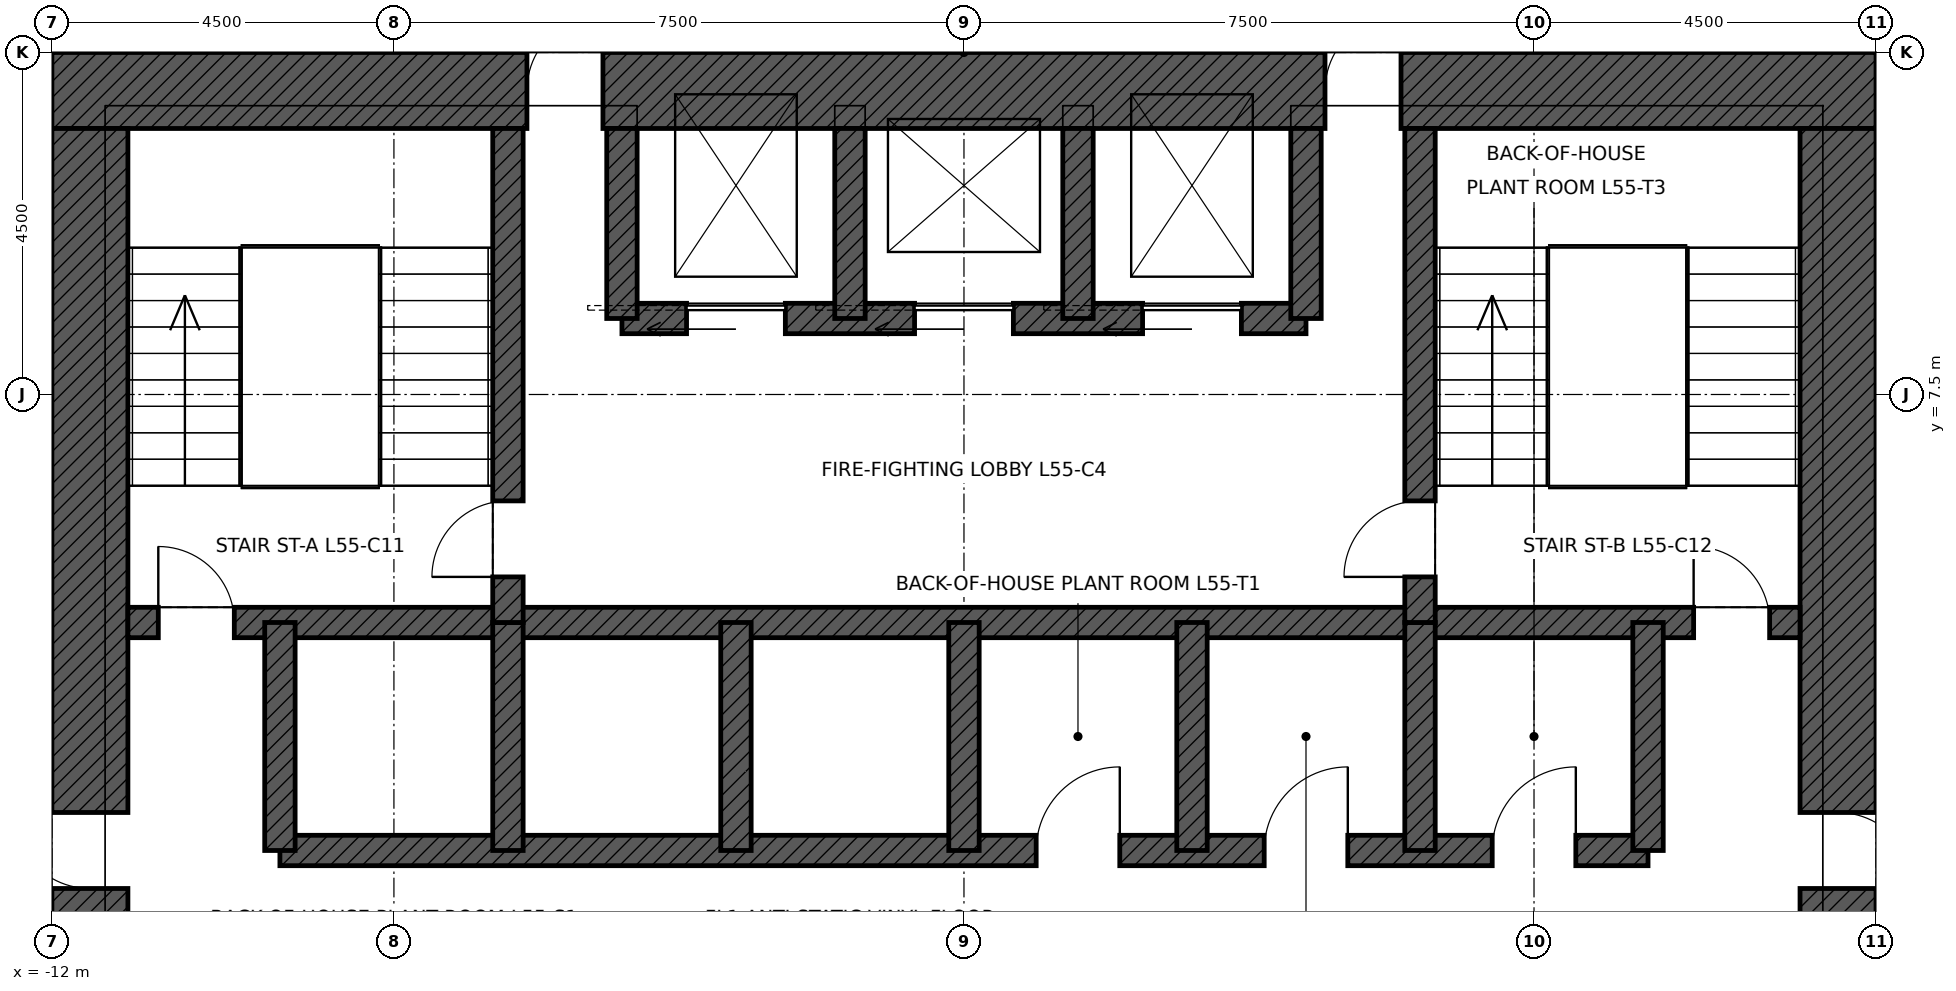
"""IFC4 building model, lengths in metres.
Left out: names, types, materials, properties, quantities, classifications, styles, units other than length and angle.
Written with IfcOpenShell. Run it as: python <this file> out.ifc"""

import sys

from ifc_helpers import new_model, si_unit, direction, frame, frame_2d, origin, place, context, subcontext, project, spatial, rectangle, extrude, element, fill, save


model = new_model("IFC4")
c1 = context("Model", 3, precision=1e-05, world=origin(), true_north=direction((0.0, 1.0)))
c2 = subcontext(c1, "Body", "Model", "MODEL_VIEW")
j1 = project(units=[si_unit("LENGTHUNIT", "METRE"), si_unit("PLANEANGLEUNIT", "RADIAN")], contexts=[c1])
p1 = place(None, origin())
s1 = spatial("IfcSite", under=j1, at=p1, CompositionType="ELEMENT")
p2 = place(p1, origin())
s2 = spatial("IfcBuilding", under=s1, at=p2, CompositionType="ELEMENT")
p3 = place(p2, frame((0.0, 0.0, 253.9)))
s3 = spatial("IfcBuildingStorey", under=s2, at=p3, CompositionType="ELEMENT", Elevation=253.9)
p4 = place(p3, frame((-12.0, 11.5, 0.0), z_axis=(0.0, 0.0, 1.0), x_axis=(1.0, 0.0, 0.0)))
e1 = element("IfcWall", 1, at=p4, inside=s3, PredefinedType="SHEAR", context=c2, shape_type="SweptSolid", body=[
    extrude(rectangle(XDim=24.0, YDim=1.0, at=frame_2d((12.0, 0.0))), origin(), (0.0, 0.0, 1.0), 6.0),
])
p5 = place(p4, frame((6.25, 0.0, 0.0)))
e2 = element("IfcOpeningElement", 2, at=p5, cuts=e1, PredefinedType="OPENING", context=c2, shape_type="SweptSolid", body=[
    extrude(rectangle(XDim=1.0, YDim=2.4, at=frame_2d((0.5, 1.2))), frame((0.0, 0.51, 0.0), z_axis=(0.0, -1.0, 0.0), x_axis=(1.0, 0.0, 0.0)), (0.0, 0.0, 1.0), 1.02),
])
p6 = place(p4, frame((16.75, 0.0, 0.0)))
e3 = element("IfcOpeningElement", 3, at=p6, cuts=e1, PredefinedType="OPENING", context=c2, shape_type="SweptSolid", body=[
    extrude(rectangle(XDim=1.0, YDim=2.4, at=frame_2d((0.5, 1.2))), frame((0.0, 0.51, 0.0), z_axis=(0.0, -1.0, 0.0), x_axis=(1.0, 0.0, 0.0)), (0.0, 0.0, 1.0), 1.02),
])
p7 = place(p3, frame((11.5, 11.0, 0.0), z_axis=(0.0, 0.0, 1.0), x_axis=(0.0, -1.0, 0.0)))
e4 = element("IfcWall", 4, at=p7, inside=s3, PredefinedType="SHEAR", context=c2, shape_type="SweptSolid", body=[
    extrude(rectangle(XDim=22.0, YDim=1.0, at=frame_2d((11.0, 0.0))), origin(), (0.0, 0.0, 1.0), 6.0),
])
p8 = place(p7, frame((9.0, 0.0, 0.0)))
e5 = element("IfcOpeningElement", 5, at=p8, cuts=e4, PredefinedType="OPENING", context=c2, shape_type="SweptSolid", body=[
    extrude(rectangle(XDim=1.0, YDim=2.4, at=frame_2d((0.5, 1.2))), frame((0.0, 0.51, 0.0), z_axis=(0.0, -1.0, 0.0), x_axis=(1.0, 0.0, 0.0)), (0.0, 0.0, 1.0), 1.02),
])
p9 = place(p3, frame((-11.5, -11.0, 0.0), z_axis=(0.0, 0.0, 1.0), x_axis=(0.0, 1.0, 0.0)))
e6 = element("IfcWall", 6, at=p9, inside=s3, PredefinedType="SHEAR", context=c2, shape_type="SweptSolid", body=[
    extrude(rectangle(XDim=22.0, YDim=1.0, at=frame_2d((11.0, 0.0))), origin(), (0.0, 0.0, 1.0), 6.0),
])
p10 = place(p9, frame((12.0, 0.0, 0.0)))
e7 = element("IfcOpeningElement", 7, at=p10, cuts=e6, PredefinedType="OPENING", context=c2, shape_type="SweptSolid", body=[
    extrude(rectangle(XDim=1.0, YDim=2.4, at=frame_2d((0.5, 1.2))), frame((0.0, 0.51, 0.0), z_axis=(0.0, -1.0, 0.0), x_axis=(1.0, 0.0, 0.0)), (0.0, 0.0, 1.0), 1.02),
])
p11 = place(p3, frame((-11.0, 4.5, 0.0), z_axis=(0.0, 0.0, 1.0), x_axis=(1.0, 0.0, 0.0)))
e8 = element("IfcWall", 8, at=p11, inside=s3, PredefinedType="SHEAR", context=c2, shape_type="SweptSolid", body=[
    extrude(rectangle(XDim=22.0, YDim=0.4, at=frame_2d((11.0, 0.0))), origin(), (0.0, 0.0, 1.0), 6.0),
])
p12 = place(p11, frame((0.4, 0.0, 0.0)))
e9 = element("IfcOpeningElement", 9, at=p12, cuts=e8, PredefinedType="OPENING", context=c2, shape_type="SweptSolid", body=[
    extrude(rectangle(XDim=1.0, YDim=2.1, at=frame_2d((0.5, 1.05))), frame((0.0, 0.21, 0.0), z_axis=(0.0, -1.0, 0.0), x_axis=(1.0, 0.0, 0.0)), (0.0, 0.0, 1.0), 0.42),
])
p13 = place(p11, frame((20.6, 0.0, 0.0)))
e10 = element("IfcOpeningElement", 10, at=p13, cuts=e8, PredefinedType="OPENING", context=c2, shape_type="SweptSolid", body=[
    extrude(rectangle(XDim=1.0, YDim=2.1, at=frame_2d((0.5, 1.05))), frame((0.0, 0.21, 0.0), z_axis=(0.0, -1.0, 0.0), x_axis=(1.0, 0.0, 0.0)), (0.0, 0.0, 1.0), 0.42),
])
p14 = place(p3, frame((-9.0, 1.5, 0.0), z_axis=(0.0, 0.0, 1.0), x_axis=(1.0, 0.0, 0.0)))
e11 = element("IfcWall", 11, at=p14, inside=s3, PredefinedType="SHEAR", context=c2, shape_type="SweptSolid", body=[
    extrude(rectangle(XDim=18.0, YDim=0.4, at=frame_2d((9.0, 0.0))), origin(), (0.0, 0.0, 1.0), 6.0),
])
p15 = place(p14, frame((9.95, 0.0, 0.0)))
e12 = element("IfcOpeningElement", 12, at=p15, cuts=e11, PredefinedType="OPENING", context=c2, shape_type="SweptSolid", body=[
    extrude(rectangle(XDim=1.1, YDim=2.1, at=frame_2d((0.55, 1.05))), frame((0.0, 0.21, 0.0), z_axis=(0.0, -1.0, 0.0), x_axis=(1.0, 0.0, 0.0)), (0.0, 0.0, 1.0), 0.42),
])
p16 = place(p14, frame((12.95, 0.0, 0.0)))
e13 = element("IfcOpeningElement", 13, at=p16, cuts=e11, PredefinedType="OPENING", context=c2, shape_type="SweptSolid", body=[
    extrude(rectangle(XDim=1.1, YDim=2.1, at=frame_2d((0.55, 1.05))), frame((0.0, 0.21, 0.0), z_axis=(0.0, -1.0, 0.0), x_axis=(1.0, 0.0, 0.0)), (0.0, 0.0, 1.0), 0.42),
])
p17 = place(p14, frame((15.95, 0.0, 0.0)))
e14 = element("IfcOpeningElement", 14, at=p17, cuts=e11, PredefinedType="OPENING", context=c2, shape_type="SweptSolid", body=[
    extrude(rectangle(XDim=1.1, YDim=2.1, at=frame_2d((0.55, 1.05))), frame((0.0, 0.21, 0.0), z_axis=(0.0, -1.0, 0.0), x_axis=(1.0, 0.0, 0.0)), (0.0, 0.0, 1.0), 0.42),
])
p18 = place(p3, frame((-4.5, 8.5, 0.0), z_axis=(0.0, 0.0, 1.0), x_axis=(1.0, 0.0, 0.0)))
e15 = element("IfcWall", 15, at=p18, inside=s3, PredefinedType="SHEAR", context=c2, shape_type="SweptSolid", body=[
    extrude(rectangle(XDim=9.0, YDim=0.4, at=frame_2d((4.5, 0.0))), origin(), (0.0, 0.0, 1.0), 6.0),
])
p19 = place(p18, frame((0.85, 0.0, 0.0)))
e16 = element("IfcOpeningElement", 16, at=p19, cuts=e15, PredefinedType="OPENING", context=c2, shape_type="SweptSolid", body=[
    extrude(rectangle(XDim=1.3, YDim=2.4, at=frame_2d((0.65, 1.2))), frame((0.0, 0.21, 0.0), z_axis=(0.0, -1.0, 0.0), x_axis=(1.0, 0.0, 0.0)), (0.0, 0.0, 1.0), 0.42),
])
p20 = place(p18, frame((6.85, 0.0, 0.0)))
e17 = element("IfcOpeningElement", 17, at=p20, cuts=e15, PredefinedType="OPENING", context=c2, shape_type="SweptSolid", body=[
    extrude(rectangle(XDim=1.3, YDim=2.4, at=frame_2d((0.65, 1.2))), frame((0.0, 0.21, 0.0), z_axis=(0.0, -1.0, 0.0), x_axis=(1.0, 0.0, 0.0)), (0.0, 0.0, 1.0), 0.42),
])
p21 = place(p18, frame((3.85, 0.0, 0.0)))
e18 = element("IfcOpeningElement", 18, at=p21, cuts=e15, PredefinedType="OPENING", context=c2, shape_type="SweptSolid", body=[
    extrude(rectangle(XDim=1.3, YDim=2.4, at=frame_2d((0.65, 1.2))), frame((0.0, 0.21, 0.0), z_axis=(0.0, -1.0, 0.0), x_axis=(1.0, 0.0, 0.0)), (0.0, 0.0, 1.0), 0.42),
])
for number, where, z_axis, x_axis in (
    (19, (-9.0, 1.5, 0.0), (0.0, 0.0, 1.0), (0.0, 1.0, 0.0)),
    (20, (9.0, 1.5, 0.0), (0.0, 0.0, 1.0), (0.0, 1.0, 0.0)),
    (21, (-6.0, 1.5, 0.0), (0.0, 0.0, 1.0), (0.0, 1.0, 0.0)),
    (22, (-3.0, 1.5, 0.0), (0.0, 0.0, 1.0), (0.0, 1.0, 0.0)),
    (23, (0.0, 1.5, 0.0), (0.0, 0.0, 1.0), (0.0, 1.0, 0.0)),
    (24, (3.0, 1.5, 0.0), (0.0, 0.0, 1.0), (0.0, 1.0, 0.0)),
    (25, (6.0, 1.5, 0.0), (0.0, 0.0, 1.0), (0.0, 1.0, 0.0)),
):
    element("IfcWall", number, at=place(p3, frame(where, z_axis=z_axis, x_axis=x_axis)), inside=s3, PredefinedType="SHEAR", context=c2, shape_type="SweptSolid", body=[
        extrude(rectangle(XDim=3.0, YDim=0.4, at=frame_2d((1.5, 0.0))), origin(), (0.0, 0.0, 1.0), 6.0),
    ])
p22 = place(p3, frame((-6.0, 4.5, 0.0), z_axis=(0.0, 0.0, 1.0), x_axis=(0.0, 1.0, 0.0)))
e26 = element("IfcWall", 26, at=p22, inside=s3, PredefinedType="SHEAR", context=c2, shape_type="SweptSolid", body=[
    extrude(rectangle(XDim=6.5, YDim=0.4, at=frame_2d((3.25, 0.0))), origin(), (0.0, 0.0, 1.0), 6.0),
])
p23 = place(p22, frame((0.6, 0.0, 0.0)))
e27 = element("IfcOpeningElement", 27, at=p23, cuts=e26, PredefinedType="OPENING", context=c2, shape_type="SweptSolid", body=[
    extrude(rectangle(XDim=1.0, YDim=2.1, at=frame_2d((0.5, 1.05))), frame((0.0, 0.21, 0.0), z_axis=(0.0, -1.0, 0.0), x_axis=(1.0, 0.0, 0.0)), (0.0, 0.0, 1.0), 0.42),
])
p24 = place(p3, frame((6.0, 4.5, 0.0), z_axis=(0.0, 0.0, 1.0), x_axis=(0.0, 1.0, 0.0)))
e28 = element("IfcWall", 28, at=p24, inside=s3, PredefinedType="SHEAR", context=c2, shape_type="SweptSolid", body=[
    extrude(rectangle(XDim=6.5, YDim=0.4, at=frame_2d((3.25, 0.0))), origin(), (0.0, 0.0, 1.0), 6.0),
])
p25 = place(p24, frame((0.6, 0.0, 0.0)))
e29 = element("IfcOpeningElement", 29, at=p25, cuts=e28, PredefinedType="OPENING", context=c2, shape_type="SweptSolid", body=[
    extrude(rectangle(XDim=1.0, YDim=2.1, at=frame_2d((0.5, 1.05))), frame((0.0, 0.21, 0.0), z_axis=(0.0, -1.0, 0.0), x_axis=(1.0, 0.0, 0.0)), (0.0, 0.0, 1.0), 0.42),
])
for number, where, z_axis, x_axis in (
    (30, (-4.5, 8.5, 0.0), (0.0, 0.0, 1.0), (0.0, 1.0, 0.0)),
    (31, (4.5, 8.5, 0.0), (0.0, 0.0, 1.0), (0.0, 1.0, 0.0)),
    (32, (-1.5, 8.5, 0.0), (0.0, 0.0, 1.0), (0.0, 1.0, 0.0)),
    (33, (1.5, 8.5, 0.0), (0.0, 0.0, 1.0), (0.0, 1.0, 0.0)),
):
    element("IfcWall", number, at=place(p3, frame(where, z_axis=z_axis, x_axis=x_axis)), inside=s3, PredefinedType="SHEAR", context=c2, shape_type="SweptSolid", body=[
        extrude(rectangle(XDim=2.5, YDim=0.4, at=frame_2d((1.25, 0.0))), origin(), (0.0, 0.0, 1.0), 6.0),
    ])
p26 = place(p12, origin())
e34 = element("IfcDoor", 34, at=p26, inside=s3, OperationType="SINGLE_SWING_LEFT", PredefinedType="DOOR", context=c2, shape_type="SweptSolid", body=[
    extrude(rectangle(XDim=1.0, YDim=2.1, at=frame_2d((0.5, 1.05))), frame((0.0, 0.025, 0.0), z_axis=(0.0, -1.0, 0.0), x_axis=(1.0, 0.0, 0.0)), (0.0, 0.0, 1.0), 0.05),
])
fill(e9, e34)
p27 = place(p13, origin())
e35 = element("IfcDoor", 35, at=p27, inside=s3, OperationType="SINGLE_SWING_LEFT", PredefinedType="DOOR", context=c2, shape_type="SweptSolid", body=[
    extrude(rectangle(XDim=1.0, YDim=2.1, at=frame_2d((0.5, 1.05))), frame((0.0, 0.025, 0.0), z_axis=(0.0, -1.0, 0.0), x_axis=(1.0, 0.0, 0.0)), (0.0, 0.0, 1.0), 0.05),
])
fill(e10, e35)
p28 = place(p23, origin())
e36 = element("IfcDoor", 36, at=p28, inside=s3, OperationType="SINGLE_SWING_LEFT", PredefinedType="DOOR", context=c2, shape_type="SweptSolid", body=[
    extrude(rectangle(XDim=1.0, YDim=2.1, at=frame_2d((0.5, 1.05))), frame((0.0, 0.025, 0.0), z_axis=(0.0, -1.0, 0.0), x_axis=(1.0, 0.0, 0.0)), (0.0, 0.0, 1.0), 0.05),
])
fill(e27, e36)
p29 = place(p25, origin())
e37 = element("IfcDoor", 37, at=p29, inside=s3, OperationType="SINGLE_SWING_LEFT", PredefinedType="DOOR", context=c2, shape_type="SweptSolid", body=[
    extrude(rectangle(XDim=1.0, YDim=2.1, at=frame_2d((0.5, 1.05))), frame((0.0, 0.025, 0.0), z_axis=(0.0, -1.0, 0.0), x_axis=(1.0, 0.0, 0.0)), (0.0, 0.0, 1.0), 0.05),
])
fill(e29, e37)
p30 = place(p5, origin())
e38 = element("IfcDoor", 38, at=p30, inside=s3, OperationType="SINGLE_SWING_RIGHT", PredefinedType="DOOR", context=c2, shape_type="SweptSolid", body=[
    extrude(rectangle(XDim=1.0, YDim=2.4, at=frame_2d((0.5, 1.2))), frame((0.0, 0.485, 0.0), z_axis=(0.0, -1.0, 0.0), x_axis=(1.0, 0.0, 0.0)), (0.0, 0.0, 1.0), 0.05),
])
fill(e2, e38)
p31 = place(p6, origin())
e39 = element("IfcDoor", 39, at=p31, inside=s3, OperationType="SINGLE_SWING_RIGHT", PredefinedType="DOOR", context=c2, shape_type="SweptSolid", body=[
    extrude(rectangle(XDim=1.0, YDim=2.4, at=frame_2d((0.5, 1.2))), frame((0.0, 0.485, 0.0), z_axis=(0.0, -1.0, 0.0), x_axis=(1.0, 0.0, 0.0)), (0.0, 0.0, 1.0), 0.05),
])
fill(e3, e39)
p32 = place(p8, origin())
e40 = element("IfcDoor", 40, at=p32, inside=s3, OperationType="SINGLE_SWING_RIGHT", PredefinedType="DOOR", context=c2, shape_type="SweptSolid", body=[
    extrude(rectangle(XDim=1.0, YDim=2.4, at=frame_2d((0.5, 1.2))), frame((0.0, 0.485, 0.0), z_axis=(0.0, -1.0, 0.0), x_axis=(1.0, 0.0, 0.0)), (0.0, 0.0, 1.0), 0.05),
])
fill(e5, e40)
p33 = place(p10, origin())
e41 = element("IfcDoor", 41, at=p33, inside=s3, OperationType="SINGLE_SWING_RIGHT", PredefinedType="DOOR", context=c2, shape_type="SweptSolid", body=[
    extrude(rectangle(XDim=1.0, YDim=2.4, at=frame_2d((0.5, 1.2))), frame((0.0, 0.485, 0.0), z_axis=(0.0, -1.0, 0.0), x_axis=(1.0, 0.0, 0.0)), (0.0, 0.0, 1.0), 0.05),
])
fill(e7, e41)
p34 = place(p19, origin())
e42 = element("IfcDoor", 42, at=p34, inside=s3, OperationType="SLIDING_TO_LEFT", PredefinedType="DOOR", context=c2, shape_type="SweptSolid", body=[
    extrude(rectangle(XDim=1.3, YDim=2.4, at=frame_2d((0.65, 1.2))), frame((0.0, 0.025, 0.0), z_axis=(0.0, -1.0, 0.0), x_axis=(1.0, 0.0, 0.0)), (0.0, 0.0, 1.0), 0.05),
])
fill(e16, e42)
p35 = place(p20, origin())
e43 = element("IfcDoor", 43, at=p35, inside=s3, OperationType="SLIDING_TO_LEFT", PredefinedType="DOOR", context=c2, shape_type="SweptSolid", body=[
    extrude(rectangle(XDim=1.3, YDim=2.4, at=frame_2d((0.65, 1.2))), frame((0.0, 0.025, 0.0), z_axis=(0.0, -1.0, 0.0), x_axis=(1.0, 0.0, 0.0)), (0.0, 0.0, 1.0), 0.05),
])
fill(e17, e43)
p36 = place(p21, origin())
e44 = element("IfcDoor", 44, at=p36, inside=s3, OperationType="SLIDING_TO_LEFT", PredefinedType="DOOR", context=c2, shape_type="SweptSolid", body=[
    extrude(rectangle(XDim=1.3, YDim=2.4, at=frame_2d((0.65, 1.2))), frame((0.0, 0.025, 0.0), z_axis=(0.0, -1.0, 0.0), x_axis=(1.0, 0.0, 0.0)), (0.0, 0.0, 1.0), 0.05),
])
fill(e18, e44)
p37 = place(p15, origin())
e45 = element("IfcDoor", 45, at=p37, inside=s3, OperationType="SINGLE_SWING_RIGHT", PredefinedType="DOOR", context=c2, shape_type="SweptSolid", body=[
    extrude(rectangle(XDim=1.1, YDim=2.1, at=frame_2d((0.55, 1.05))), frame((0.0, 0.025, 0.0), z_axis=(0.0, -1.0, 0.0), x_axis=(1.0, 0.0, 0.0)), (0.0, 0.0, 1.0), 0.05),
])
fill(e12, e45)
p38 = place(p16, origin())
e46 = element("IfcDoor", 46, at=p38, inside=s3, OperationType="SINGLE_SWING_RIGHT", PredefinedType="DOOR", context=c2, shape_type="SweptSolid", body=[
    extrude(rectangle(XDim=1.1, YDim=2.1, at=frame_2d((0.55, 1.05))), frame((0.0, 0.025, 0.0), z_axis=(0.0, -1.0, 0.0), x_axis=(1.0, 0.0, 0.0)), (0.0, 0.0, 1.0), 0.05),
])
fill(e13, e46)
p39 = place(p17, origin())
e47 = element("IfcDoor", 47, at=p39, inside=s3, OperationType="SINGLE_SWING_RIGHT", PredefinedType="DOOR", context=c2, shape_type="SweptSolid", body=[
    extrude(rectangle(XDim=1.1, YDim=2.1, at=frame_2d((0.55, 1.05))), frame((0.0, 0.025, 0.0), z_axis=(0.0, -1.0, 0.0), x_axis=(1.0, 0.0, 0.0)), (0.0, 0.0, 1.0), 0.05),
])
fill(e14, e47)
save(model, sys.argv[1])
